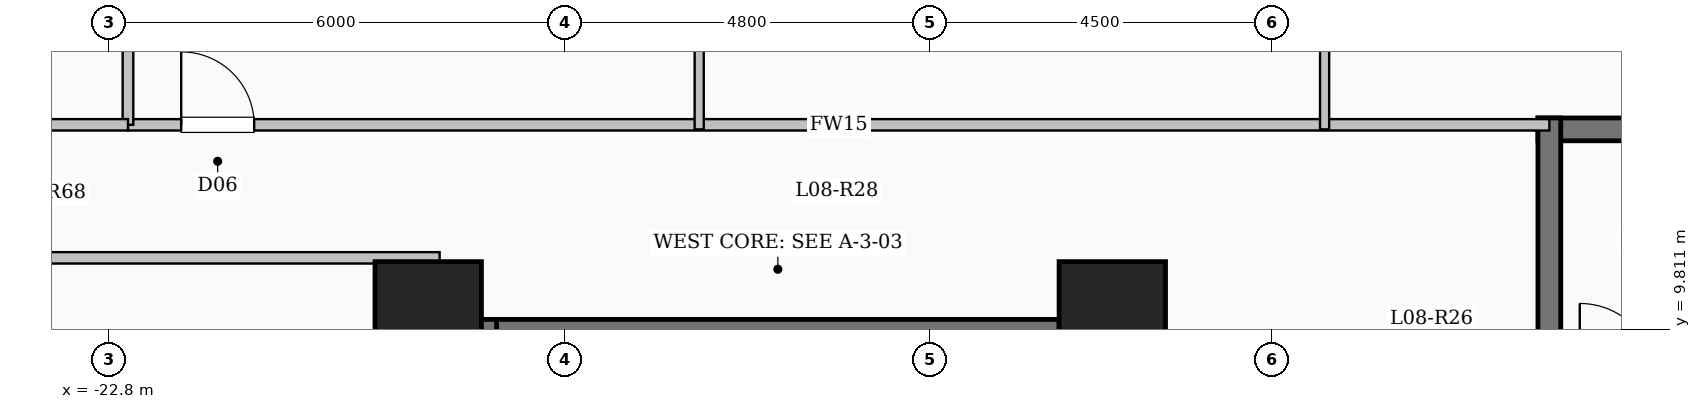
"""IFC4 building model, lengths in metres.
Left out: names, types, materials, properties, quantities, classifications, styles, units other than length and angle.
Written with IfcOpenShell. Run it as: python <this file> out.ifc"""

import sys

from ifc_helpers import new_model, si_unit, direction, frame, frame_2d, origin, origin_2d, place, context, subcontext, project, spatial, rectangle, extrude, element, fill, save


model = new_model("IFC4")
c1 = context("Model", 3, precision=1e-05, world=origin(), true_north=direction((0.0, 1.0)))
c2 = subcontext(c1, "Body", "Model", "MODEL_VIEW")
j1 = project(units=[si_unit("LENGTHUNIT", "METRE"), si_unit("PLANEANGLEUNIT", "RADIAN")], contexts=[c1])
p1 = place(None, origin())
s1 = spatial("IfcSite", under=j1, at=p1, CompositionType="ELEMENT")
p2 = place(p1, origin())
s2 = spatial("IfcBuilding", under=s1, at=p2, CompositionType="ELEMENT")
p3 = place(p2, frame((0.0, 0.0, 34.05)))
s3 = spatial("IfcBuildingStorey", under=s2, at=p3, CompositionType="ELEMENT", Elevation=34.05)
for number, where, z_axis, x_axis in (
    (1, (-9.6, 10.0, 0.0), (0.0, 0.0, 1.0), (1.0, 0.0, 0.0)),
    (2, (-18.6, 10.0, 0.0), (0.0, 0.0, 1.0), (1.0, 0.0, 0.0)),
):
    element("IfcColumn", number, at=place(p3, frame(where, z_axis=z_axis, x_axis=x_axis)), inside=s3, PredefinedType="COLUMN", context=c2, shape_type="SweptSolid", body=[
        extrude(rectangle(XDim=1.4, YDim=1.4, at=origin_2d()), origin(), (0.0, 0.0, 1.0), 3.35),
    ])
p4 = place(p3, frame((-18.0, 9.79, 0.0), z_axis=(0.0, 0.0, 1.0), x_axis=(1.0, 0.0, 0.0)))
e3 = element("IfcWall", 3, at=p4, inside=s3, PredefinedType="SHEAR", context=c2, shape_type="SweptSolid", body=[
    extrude(rectangle(XDim=8.0, YDim=0.3, at=frame_2d((4.0, 0.0))), origin(), (0.0, 0.0, 1.0), 3.35),
])
for number, where, z_axis, x_axis in (
    (4, (-17.85, 6.35, 0.0), (0.0, 0.0, 1.0), (0.0, 1.0, 0.0)),
    (5, (-10.15, 6.35, 0.0), (0.0, 0.0, 1.0), (0.0, 1.0, 0.0)),
):
    element("IfcWall", number, at=place(p3, frame(where, z_axis=z_axis, x_axis=x_axis)), inside=s3, PredefinedType="SHEAR", context=c2, shape_type="SweptSolid", body=[
        extrude(rectangle(XDim=3.59, YDim=0.3, at=frame_2d((1.795, 0.0))), origin(), (0.0, 0.0, 1.0), 3.35),
    ])
p5 = place(p3, frame((-4.0, 12.44, 0.0), z_axis=(0.0, 0.0, 1.0), x_axis=(1.0, 0.0, 0.0)))
e6 = element("IfcWall", 6, at=p5, inside=s3, PredefinedType="SHEAR", context=c2, shape_type="SweptSolid", body=[
    extrude(rectangle(XDim=8.0, YDim=0.3, at=frame_2d((4.0, 0.0))), origin(), (0.0, 0.0, 1.0), 3.35),
])
p6 = place(p3, frame((-3.85, 9.0, 0.0), z_axis=(0.0, 0.0, 1.0), x_axis=(0.0, 1.0, 0.0)))
e7 = element("IfcWall", 7, at=p6, inside=s3, PredefinedType="SHEAR", context=c2, shape_type="SweptSolid", body=[
    extrude(rectangle(XDim=3.59, YDim=0.3, at=frame_2d((1.795, 0.0))), origin(), (0.0, 0.0, 1.0), 3.35),
])
p7 = place(p3, frame((-22.55, 12.5, 0.0), z_axis=(0.0, 0.0, 1.0), x_axis=(1.0, 0.0, 0.0)))
e8 = element("IfcWall", 8, at=p7, inside=s3, PredefinedType="PARTITIONING", context=c2, shape_type="SweptSolid", body=[
    extrude(rectangle(XDim=18.7, YDim=0.15, at=frame_2d((9.35, 0.0))), origin(), (0.0, 0.0, 1.0), 3.1),
])
p8 = place(p7, frame((0.7, 0.0, 0.0)))
e9 = element("IfcOpeningElement", 9, at=p8, cuts=e8, PredefinedType="OPENING", context=c2, shape_type="SweptSolid", body=[
    extrude(rectangle(XDim=0.96, YDim=2.15, at=frame_2d((0.48, 1.075))), frame((0.0, 0.085, 0.0), z_axis=(0.0, -1.0, 0.0), x_axis=(1.0, 0.0, 0.0)), (0.0, 0.0, 1.0), 0.17),
])
p9 = place(p3, frame((-15.035, 12.44, 0.0), z_axis=(0.0, 0.0, 1.0), x_axis=(0.0, 1.0, 0.0)))
e10 = element("IfcWall", 10, at=p9, inside=s3, PredefinedType="PARTITIONING", context=c2, shape_type="SweptSolid", body=[
    extrude(rectangle(XDim=11.16, YDim=0.12, at=frame_2d((5.58, 0.0))), origin(), (0.0, 0.0, 1.0), 2.435),
])
p10 = place(p9, frame((2.905, 0.0, 0.0)))
e11 = element("IfcOpeningElement", 11, at=p10, cuts=e10, PredefinedType="OPENING", context=c2, shape_type="SweptSolid", body=[
    extrude(rectangle(XDim=1.08, YDim=2.15, at=frame_2d((0.54, 1.075))), frame((0.0, 0.07, 0.0), z_axis=(0.0, -1.0, 0.0), x_axis=(1.0, 0.0, 0.0)), (0.0, 0.0, 1.0), 0.14),
])
p11 = place(p3, frame((-6.807, 12.44, 0.0), z_axis=(0.0, 0.0, 1.0), x_axis=(0.0, 1.0, 0.0)))
e12 = element("IfcWall", 12, at=p11, inside=s3, PredefinedType="PARTITIONING", context=c2, shape_type="SweptSolid", body=[
    extrude(rectangle(XDim=2.62, YDim=0.12, at=frame_2d((1.31, 0.0))), origin(), (0.0, 0.0, 1.0), 3.1),
])
p12 = place(p3, frame((-28.68, 10.75, 0.0), z_axis=(0.0, 0.0, 1.0), x_axis=(1.0, 0.0, 0.0)))
e13 = element("IfcWall", 13, at=p12, inside=s3, PredefinedType="PARTITIONING", context=c2, shape_type="SweptSolid", body=[
    extrude(rectangle(XDim=10.23, YDim=0.15, at=frame_2d((5.115, 0.0))), origin(), (0.0, 0.0, 1.0), 3.1),
])
p13 = place(p3, frame((-22.55, 12.5, 0.0), z_axis=(0.0, 0.0, 1.0), x_axis=(0.0, 1.0, 0.0)))
e14 = element("IfcWall", 14, at=p13, inside=s3, PredefinedType="PARTITIONING", context=c2, shape_type="SweptSolid", body=[
    extrude(rectangle(XDim=6.55, YDim=0.14, at=frame_2d((3.275, 0.0))), origin(), (0.0, 0.0, 1.0), 3.1),
])
p14 = place(p3, frame((-28.68, 12.5, 0.0), z_axis=(0.0, 0.0, 1.0), x_axis=(1.0, 0.0, 0.0)))
e15 = element("IfcWall", 15, at=p14, inside=s3, PredefinedType="PARTITIONING", context=c2, shape_type="SweptSolid", body=[
    extrude(rectangle(XDim=6.13, YDim=0.15, at=frame_2d((3.065, 0.0))), origin(), (0.0, 0.0, 1.0), 3.1),
])
p15 = place(p14, frame((2.59, 0.0, 0.0)))
e16 = element("IfcOpeningElement", 16, at=p15, cuts=e15, PredefinedType="OPENING", context=c2, shape_type="SweptSolid", body=[
    extrude(rectangle(XDim=0.95, YDim=2.15, at=frame_2d((0.475, 1.075))), frame((0.0, 0.085, 0.0), z_axis=(0.0, -1.0, 0.0), x_axis=(1.0, 0.0, 0.0)), (0.0, 0.0, 1.0), 0.17),
])
p16 = place(p8, origin())
e17 = element("IfcDoor", 17, at=p16, inside=s3, OperationType="SINGLE_SWING_LEFT", PredefinedType="DOOR", context=c2, shape_type="SweptSolid", body=[
    extrude(rectangle(XDim=0.96, YDim=2.15, at=frame_2d((0.48, 1.075))), frame((0.0, 0.025, 0.0), z_axis=(0.0, -1.0, 0.0), x_axis=(1.0, 0.0, 0.0)), (0.0, 0.0, 1.0), 0.05),
])
fill(e9, e17)
save(model, sys.argv[1])
